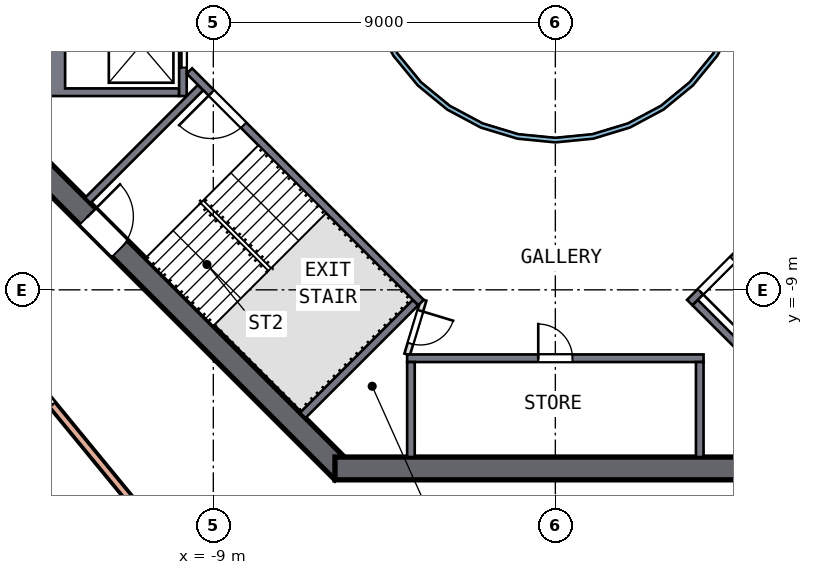
"""IFC4 building model, lengths in metres.
Left out: names, types, materials, properties, quantities, classifications, styles, units other than length and angle.
Written with IfcOpenShell. Run it as: python <this file> out.ifc"""

import sys

from ifc_helpers import new_model, si_unit, direction, frame, frame_2d, origin, place, context, subcontext, project, spatial, polyline, rectangle, outline, extrude, element, fill, save


model = new_model("IFC4")
c1 = context("Model", 3, precision=1e-05, world=origin(), true_north=direction((0.0, 1.0)))
c2 = subcontext(c1, "Body", "Model", "MODEL_VIEW")
j1 = project(units=[si_unit("LENGTHUNIT", "METRE"), si_unit("PLANEANGLEUNIT", "RADIAN")], contexts=[c1])
p1 = place(None, origin())
s1 = spatial("IfcSite", under=j1, at=p1, CompositionType="ELEMENT")
p2 = place(p1, origin())
s2 = spatial("IfcBuilding", under=s1, at=p2, CompositionType="ELEMENT")
p3 = place(p2, frame((0.0, 0.0, 194.0)))
s3 = spatial("IfcBuildingStorey", under=s2, at=p3, CompositionType="ELEMENT", Elevation=194.0)
p4 = place(p3, frame((-13.788, -5.587, 0.0), z_axis=(0.0, 0.0, 1.0), x_axis=(0.707106781, -0.707106781, 0.0)))
e1 = element("IfcWall", 1, at=p4, inside=s3, PredefinedType="SHEAR", context=c2, shape_type="SweptSolid", body=[
    extrude(rectangle(XDim=11.598, YDim=0.6, at=frame_2d((5.799, 0.0))), origin(), (0.0, 0.0, 1.0), 3.5),
])
p5 = place(p4, frame((2.099, 0.0, 0.0)))
e2 = element("IfcOpeningElement", 2, at=p5, cuts=e1, PredefinedType="OPENING", context=c2, shape_type="SweptSolid", body=[
    extrude(rectangle(XDim=1.2, YDim=2.1, at=frame_2d((0.6, 1.05))), frame((0.0, 0.31, 0.0), z_axis=(0.0, -1.0, 0.0), x_axis=(1.0, 0.0, 0.0)), (0.0, 0.0, 1.0), 0.62),
])
p6 = place(p3, frame((-5.799, -13.7, 0.0), z_axis=(0.0, 0.0, 1.0), x_axis=(1.0, 0.0, 0.0)))
e3 = element("IfcWall", 3, at=p6, inside=s3, PredefinedType="SHEAR", context=c2, shape_type="SweptSolid", body=[
    extrude(rectangle(XDim=11.598, YDim=0.6, at=frame_2d((5.799, 0.0))), origin(), (0.0, 0.0, 1.0), 3.5),
])
p7 = place(p3, frame((-9.685, -16.351, 0.0), z_axis=(0.0, 0.0, 1.0), x_axis=(-0.634198612, 0.773170176, 0.0)))
e4 = element("IfcWall", 4, at=p7, inside=s3, PredefinedType="SOLIDWALL", context=c2, shape_type="SweptSolid", body=[
    extrude(rectangle(XDim=13.0, YDim=0.2, at=frame_2d((6.5, 0.0))), origin(), (0.0, 0.0, 1.0), 3.19),
])
p8 = place(p7, frame((5.6, 0.0, 0.0)))
e5 = element("IfcOpeningElement", 5, at=p8, cuts=e4, PredefinedType="OPENING", context=c2, shape_type="SweptSolid", body=[
    extrude(rectangle(XDim=1.8, YDim=2.4, at=frame_2d((0.9, 1.2))), frame((0.0, 0.11, 0.0), z_axis=(0.0, -1.0, 0.0), x_axis=(1.0, 0.0, 0.0)), (0.0, 0.0, 1.0), 0.22),
])
p9 = place(p3, origin())
e6 = element("IfcWall", 6, at=p9, inside=s3, PredefinedType="SOLIDWALL", context=c2, shape_type="SweptSolid", body=[
    extrude(outline(polyline([(-13.4, -3.9), (-13.4, -1.2), (-9.9, -1.2), (-9.9, -1.4), (-12.9, -1.4), (-12.9, -3.7), (-9.9, -3.7), (-9.9, -3.9), (-13.4, -3.9)])), origin(), (0.0, 0.0, 1.0), 3.19),
])
p10 = place(p3, frame((-9.8, -1.2, 0.0), z_axis=(0.0, 0.0, 1.0), x_axis=(0.0, -1.0, 0.0)))
e7 = element("IfcWall", 7, at=p10, inside=s3, PredefinedType="SOLIDWALL", context=c2, shape_type="SweptSolid", body=[
    extrude(rectangle(XDim=2.7, YDim=0.2, at=frame_2d((1.35, 0.0))), origin(), (0.0, 0.0, 1.0), 3.19),
])
p11 = place(p10, frame((0.75, 0.0, 0.0)))
e8 = element("IfcOpeningElement", 8, at=p11, cuts=e7, PredefinedType="OPENING", context=c2, shape_type="SweptSolid", body=[
    extrude(rectangle(XDim=1.2, YDim=2.1, at=frame_2d((0.6, 1.05))), frame((0.0, 0.11, 0.0), z_axis=(0.0, -1.0, 0.0), x_axis=(1.0, 0.0, 0.0)), (0.0, 0.0, 1.0), 0.22),
])
p12 = place(p3, frame((-3.9, -10.8, 0.0), z_axis=(0.0, 0.0, 1.0), x_axis=(1.0, 0.0, 0.0)))
e9 = element("IfcWall", 9, at=p12, inside=s3, PredefinedType="SOLIDWALL", context=c2, shape_type="SweptSolid", body=[
    extrude(rectangle(XDim=7.8, YDim=0.2, at=frame_2d((3.9, 0.0))), origin(), (0.0, 0.0, 1.0), 3.19),
])
p13 = place(p12, frame((3.45, 0.0, 0.0)))
e10 = element("IfcOpeningElement", 10, at=p13, cuts=e9, PredefinedType="OPENING", context=c2, shape_type="SweptSolid", body=[
    extrude(rectangle(XDim=0.9, YDim=2.1, at=frame_2d((0.45, 1.05))), frame((0.0, 0.11, 0.0), z_axis=(0.0, -1.0, 0.0), x_axis=(1.0, 0.0, 0.0)), (0.0, 0.0, 1.0), 0.22),
])
for number, where, z_axis, x_axis in (
    (11, (-3.8, -10.9, 0.0), (0.0, 0.0, 1.0), (0.0, -1.0, 0.0)),
    (12, (3.8, -10.9, 0.0), (0.0, 0.0, 1.0), (0.0, -1.0, 0.0)),
):
    element("IfcWall", number, at=place(p3, frame(where, z_axis=z_axis, x_axis=x_axis)), inside=s3, PredefinedType="SOLIDWALL", context=c2, shape_type="SweptSolid", body=[
        extrude(rectangle(XDim=2.5, YDim=0.2, at=frame_2d((1.25, 0.0))), origin(), (0.0, 0.0, 1.0), 3.19),
    ])
p14 = place(p3, frame((-3.535, -9.334, 0.0), z_axis=(0.0, 0.0, 1.0), x_axis=(-0.707120946, 0.707092617, 0.0)))
e13 = element("IfcWall", 13, at=p14, inside=s3, PredefinedType="SOLIDWALL", context=c2, shape_type="SweptSolid", body=[
    extrude(rectangle(XDim=8.618, YDim=0.2, at=frame_2d((4.309, 0.0))), origin(), (0.0, 0.0, 1.0), 3.19),
])
p15 = place(p14, frame((6.6, 0.0, 0.0)))
e14 = element("IfcOpeningElement", 14, at=p15, cuts=e13, PredefinedType="OPENING", context=c2, shape_type="SweptSolid", body=[
    extrude(rectangle(XDim=1.2, YDim=2.1, at=frame_2d((0.6, 1.05))), frame((0.0, 0.11, 0.0), z_axis=(0.0, -1.0, 0.0), x_axis=(1.0, 0.0, 0.0)), (0.0, 0.0, 1.0), 0.22),
])
for number, where, z_axis, x_axis in (
    (15, (-9.334, -3.677, 0.0), (0.0, 0.0, 1.0), (-0.707, -0.707, 0.0)),
    (16, (-3.677, -9.334, 0.0), (0.0, 0.0, 1.0), (-0.707, -0.707, 0.0)),
):
    element("IfcWall", number, at=place(p3, frame(where, z_axis=z_axis, x_axis=x_axis)), inside=s3, PredefinedType="SOLIDWALL", context=c2, shape_type="SweptSolid", body=[
        extrude(rectangle(XDim=4.2, YDim=0.2, at=frame_2d((2.1, 0.0))), origin(), (0.0, 0.0, 1.0), 3.19),
    ])
p16 = place(p3, frame((9.629, -3.24, 0.0), z_axis=(0.0, 0.0, 1.0), x_axis=(-0.707120946, -0.707092617, 0.0)))
e17 = element("IfcWall", 17, at=p16, inside=s3, PredefinedType="SOLIDWALL", context=c2, shape_type="SweptSolid", body=[
    extrude(rectangle(XDim=8.618, YDim=0.2, at=frame_2d((4.309, 0.0))), origin(), (0.0, 0.0, 1.0), 3.19),
])
p17 = place(p16, frame((7.018, 0.0, 0.0)))
e18 = element("IfcOpeningElement", 18, at=p17, cuts=e17, PredefinedType="OPENING", context=c2, shape_type="SweptSolid", body=[
    extrude(rectangle(XDim=1.2, YDim=2.1, at=frame_2d((0.6, 1.05))), frame((0.0, 0.11, 0.0), z_axis=(0.0, -1.0, 0.0), x_axis=(1.0, 0.0, 0.0)), (0.0, 0.0, 1.0), 0.22),
])
p18 = place(p3, frame((3.677, -9.334, 0.0), z_axis=(0.0, 0.0, 1.0), x_axis=(0.707077716, -0.707135845, 0.0)))
e19 = element("IfcWall", 19, at=p18, inside=s3, PredefinedType="SOLIDWALL", context=c2, shape_type="SweptSolid", body=[
    extrude(rectangle(XDim=4.2, YDim=0.2, at=frame_2d((2.1, 0.0))), origin(), (0.0, 0.0, 1.0), 3.19),
])
p19 = place(p3, frame((-3.465, -9.263, 0.0), z_axis=(0.0, 0.0, 1.0), x_axis=(-0.289808785, -0.957084567, 0.0)))
e20 = element("IfcWall", 20, at=p19, inside=s3, PredefinedType="PARTITIONING", context=c2, shape_type="SweptSolid", body=[
    extrude(rectangle(XDim=1.501, YDim=0.15, at=frame_2d((0.75, 0.0))), origin(), (0.0, 0.0, 1.0), 3.19),
])
p20 = place(p19, frame((0.301, 0.0, 0.0)))
e21 = element("IfcOpeningElement", 21, at=p20, cuts=e20, PredefinedType="OPENING", context=c2, shape_type="SweptSolid", body=[
    extrude(rectangle(XDim=0.9, YDim=2.1, at=frame_2d((0.45, 1.05))), frame((0.0, 0.085, 0.0), z_axis=(0.0, -1.0, 0.0), x_axis=(1.0, 0.0, 0.0)), (0.0, 0.0, 1.0), 0.17),
])
p21 = place(p3, origin())
e22 = element("IfcWall", 22, at=p21, inside=s3, PredefinedType="SOLIDWALL", context=c2, shape_type="SweptSolid", body=[
    extrude(outline(polyline([(5.021, -0.999), (4.73, -1.959), (4.257, -2.844), (3.62, -3.62), (2.844, -4.257), (1.959, -4.73), (0.999, -5.021), (0.0, -5.12), (-0.999, -5.021), (-1.959, -4.73), (-2.844, -4.257), (-3.62, -3.62), (-4.257, -2.844), (-4.73, -1.959), (-5.021, -0.999), (-5.12, 0.0), (-5.021, 0.999), (-4.73, 1.959), (-4.257, 2.844), (-3.62, 3.62), (-2.844, 4.257), (-1.959, 4.73), (-0.999, 5.021), (0.0, 5.12), (0.999, 5.021), (1.959, 4.73), (2.844, 4.257), (3.62, 3.62), (4.257, 2.844), (4.73, 1.959), (5.021, 0.999), (5.12, 0.0), (5.021, -0.999)]), holes=[polyline([(4.904, 0.976), (4.619, 1.913), (4.157, 2.778), (3.535, 3.535), (2.778, 4.157), (1.913, 4.619), (0.976, 4.904), (0.0, 5.0), (-0.976, 4.904), (-1.913, 4.619), (-2.778, 4.157), (-3.535, 3.535), (-4.157, 2.778), (-4.619, 1.913), (-4.904, 0.976), (-5.0, 0.0), (-4.904, -0.976), (-4.619, -1.913), (-4.157, -2.778), (-3.535, -3.535), (-2.778, -4.157), (-1.913, -4.619), (-0.976, -4.904), (0.0, -5.0), (0.976, -4.904), (1.913, -4.619), (2.778, -4.157), (3.535, -3.535), (4.157, -2.778), (4.619, -1.913), (4.904, -0.976), (5.0, 0.0), (4.904, 0.976)])]), origin(), (0.0, 0.0, 1.0), 3.19),
])
p22 = place(p8, origin())
e23 = element("IfcDoor", 23, at=p22, inside=s3, OperationType="DOUBLE_DOOR_SINGLE_SWING", PredefinedType="DOOR", context=c2, shape_type="SweptSolid", body=[
    extrude(rectangle(XDim=1.8, YDim=2.4, at=frame_2d((0.9, 1.2))), frame((0.0, 0.025, 0.0), z_axis=(0.0, -1.0, 0.0), x_axis=(1.0, 0.0, 0.0)), (0.0, 0.0, 1.0), 0.05),
])
fill(e5, e23)
p23 = place(p13, origin())
e24 = element("IfcDoor", 24, at=p23, inside=s3, OperationType="SINGLE_SWING_LEFT", PredefinedType="DOOR", context=c2, shape_type="SweptSolid", body=[
    extrude(rectangle(XDim=0.9, YDim=2.1, at=frame_2d((0.45, 1.05))), frame((0.0, 0.025, 0.0), z_axis=(0.0, -1.0, 0.0), x_axis=(1.0, 0.0, 0.0)), (0.0, 0.0, 1.0), 0.05),
])
fill(e10, e24)
p24 = place(p11, origin())
e25 = element("IfcDoor", 25, at=p24, inside=s3, OperationType="DOUBLE_DOOR_SLIDING", PredefinedType="DOOR", context=c2, shape_type="SweptSolid", body=[
    extrude(rectangle(XDim=1.2, YDim=2.1, at=frame_2d((0.6, 1.05))), frame((0.0, 0.025, 0.0), z_axis=(0.0, -1.0, 0.0), x_axis=(1.0, 0.0, 0.0)), (0.0, 0.0, 1.0), 0.05),
])
fill(e8, e25)
p25 = place(p15, origin())
e26 = element("IfcDoor", 26, at=p25, inside=s3, OperationType="SINGLE_SWING_RIGHT", PredefinedType="DOOR", context=c2, shape_type="SweptSolid", body=[
    extrude(rectangle(XDim=1.2, YDim=2.1, at=frame_2d((0.6, 1.05))), frame((0.0, 0.025, 0.0), z_axis=(0.0, -1.0, 0.0), x_axis=(1.0, 0.0, 0.0)), (0.0, 0.0, 1.0), 0.05),
])
fill(e14, e26)
p26 = place(p17, origin())
e27 = element("IfcDoor", 27, at=p26, inside=s3, OperationType="SINGLE_SWING_RIGHT", PredefinedType="DOOR", context=c2, shape_type="SweptSolid", body=[
    extrude(rectangle(XDim=1.2, YDim=2.1, at=frame_2d((0.6, 1.05))), frame((0.0, 0.025, 0.0), z_axis=(0.0, -1.0, 0.0), x_axis=(1.0, 0.0, 0.0)), (0.0, 0.0, 1.0), 0.05),
])
fill(e18, e27)
p27 = place(p5, origin())
e28 = element("IfcDoor", 28, at=p27, inside=s3, OperationType="SINGLE_SWING_LEFT", PredefinedType="DOOR", context=c2, shape_type="SweptSolid", body=[
    extrude(rectangle(XDim=1.2, YDim=2.1, at=frame_2d((0.6, 1.05))), frame((0.0, 0.025, 0.0), z_axis=(0.0, -1.0, 0.0), x_axis=(1.0, 0.0, 0.0)), (0.0, 0.0, 1.0), 0.05),
])
fill(e2, e28)
p28 = place(p20, origin())
e29 = element("IfcDoor", 29, at=p28, inside=s3, OperationType="SINGLE_SWING_LEFT", PredefinedType="DOOR", context=c2, shape_type="SweptSolid", body=[
    extrude(rectangle(XDim=0.9, YDim=2.1, at=frame_2d((0.45, 1.05))), frame((0.0, 0.025, 0.0), z_axis=(0.0, -1.0, 0.0), x_axis=(1.0, 0.0, 0.0)), (0.0, 0.0, 1.0), 0.05),
])
fill(e21, e29)
save(model, sys.argv[1])
